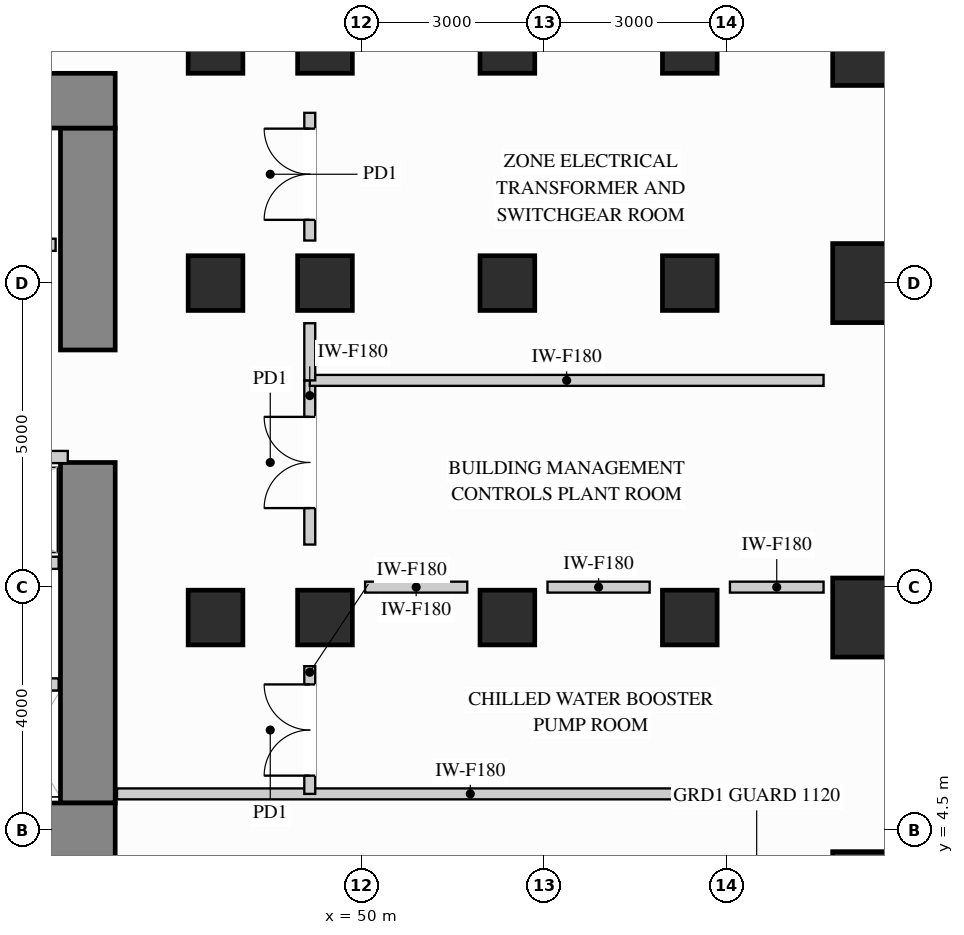
"""IFC4 building model, lengths in metres.
Left out: names, types, materials, properties, quantities, classifications, styles, units other than length and angle.
Written with IfcOpenShell. Run it as: python <this file> out.ifc"""

import sys

from ifc_helpers import new_model, si_unit, direction, frame, frame_2d, origin, origin_2d, place, context, subcontext, project, spatial, rectangle, extrude, source, transform, mapped, element, fill, save


model = new_model("IFC4")
c1 = context("Model", 3, precision=1e-05, world=origin(), true_north=direction((0.0, 1.0)))
c2 = subcontext(c1, "Body", "Model", "MODEL_VIEW")
j1 = project(units=[si_unit("LENGTHUNIT", "METRE"), si_unit("PLANEANGLEUNIT", "RADIAN")], contexts=[c1])
p1 = place(None, origin())
s1 = spatial("IfcSite", under=j1, at=p1, CompositionType="ELEMENT")
p2 = place(p1, origin())
s2 = spatial("IfcBuilding", under=s1, at=p2, CompositionType="ELEMENT")
p3 = place(p2, frame((0.0, 0.0, 72.9)))
s3 = spatial("IfcBuildingStorey", under=s2, at=p3, CompositionType="ELEMENT", Elevation=72.9)
m1 = source(origin(), c2, "Body", "SweptSolid", [
    extrude(rectangle(XDim=0.9, YDim=0.9, at=origin_2d()), origin(), (0.0, 0.0, 1.0), 4.26),
])
for number, where, z_axis, x_axis in (
    (1, (47.6, 13.5, 0.0), (0.0, 0.0, 1.0), (1.0, 0.0, 0.0)),
    (2, (47.6, 8.0, 0.0), (0.0, 0.0, 1.0), (1.0, 0.0, 0.0)),
    (3, (47.6, 17.4, 0.0), (0.0, 0.0, 1.0), (1.0, 0.0, 0.0)),
    (4, (49.4, 13.5, 0.0), (0.0, 0.0, 1.0), (1.0, 0.0, 0.0)),
    (5, (49.4, 17.4, 0.0), (0.0, 0.0, 1.0), (1.0, 0.0, 0.0)),
    (6, (49.4, 8.0, 0.0), (0.0, 0.0, 1.0), (1.0, 0.0, 0.0)),
    (7, (52.4, 13.5, 0.0), (0.0, 0.0, 1.0), (1.0, 0.0, 0.0)),
    (8, (52.4, 17.4, 0.0), (0.0, 0.0, 1.0), (1.0, 0.0, 0.0)),
    (9, (52.4, 8.0, 0.0), (0.0, 0.0, 1.0), (1.0, 0.0, 0.0)),
    (10, (55.4, 13.5, 0.0), (0.0, 0.0, 1.0), (1.0, 0.0, 0.0)),
    (11, (55.4, 17.4, 0.0), (0.0, 0.0, 1.0), (1.0, 0.0, 0.0)),
    (12, (55.4, 8.0, 0.0), (0.0, 0.0, 1.0), (1.0, 0.0, 0.0)),
):
    element("IfcColumn", number, at=place(p3, frame(where, z_axis=z_axis, x_axis=x_axis)), inside=s3, PredefinedType="COLUMN", context=c2, shape_type="MappedRepresentation", body=[
        mapped(m1, transform((0.0, 0.0, 0.0), x_axis=(1.0, 0.0, 0.0), y_axis=(0.0, 1.0, 0.0), z_axis=(0.0, 0.0, 1.0))),
    ])
m2 = source(origin(), c2, "Body", "SweptSolid", [
    extrude(rectangle(XDim=1.3, YDim=1.3, at=origin_2d()), origin(), (0.0, 0.0, 1.0), 4.26),
])
for number, where, z_axis, x_axis in (
    (13, (58.4, 13.5, 0.0), (0.0, 0.0, 1.0), (1.0, 0.0, 0.0)),
    (14, (58.4, 17.4, 0.0), (0.0, 0.0, 1.0), (1.0, 0.0, 0.0)),
    (15, (58.4, 3.5, 0.0), (0.0, 0.0, 1.0), (1.0, 0.0, 0.0)),
    (16, (58.4, 8.0, 0.0), (0.0, 0.0, 1.0), (1.0, 0.0, 0.0)),
):
    element("IfcColumn", number, at=place(p3, frame(where, z_axis=z_axis, x_axis=x_axis)), inside=s3, PredefinedType="COLUMN", context=c2, shape_type="MappedRepresentation", body=[
        mapped(m2, transform((0.0, 0.0, 0.0), x_axis=(1.0, 0.0, 0.0), y_axis=(0.0, 1.0, 0.0), z_axis=(0.0, 0.0, 1.0))),
    ])
m3 = source(origin(), c2, "Body", "SweptSolid", [
    extrude(rectangle(XDim=5.6, YDim=0.9, at=frame_2d((2.8, 0.0))), origin(), (0.0, 0.0, 1.0), 4.26),
])
p4 = place(p3, frame((45.5, 4.95, 0.0), z_axis=(0.0, 0.0, 1.0), x_axis=(0.0, 1.0, 0.0)))
e17 = element("IfcWall", 17, at=p4, inside=s3, PredefinedType="SHEAR", context=c2, shape_type="MappedRepresentation", body=[
    mapped(m3, transform((0.0, 0.0, 0.0), x_axis=(1.0, 0.0, 0.0), y_axis=(0.0, 1.0, 0.0), z_axis=(0.0, 0.0, 1.0))),
])
m4 = source(origin(), c2, "Body", "SweptSolid", [
    extrude(rectangle(XDim=3.65, YDim=0.9, at=frame_2d((1.825, 0.0))), origin(), (0.0, 0.0, 1.0), 4.26),
])
p5 = place(p3, frame((45.5, 12.4, 0.0), z_axis=(0.0, 0.0, 1.0), x_axis=(0.0, 1.0, 0.0)))
e18 = element("IfcWall", 18, at=p5, inside=s3, PredefinedType="SHEAR", context=c2, shape_type="MappedRepresentation", body=[
    mapped(m4, transform((0.0, 0.0, 0.0), x_axis=(1.0, 0.0, 0.0), y_axis=(0.0, 1.0, 0.0), z_axis=(0.0, 0.0, 1.0))),
])
m5 = source(origin(), c2, "Body", "SweptSolid", [
    extrude(rectangle(XDim=10.4, YDim=0.9, at=frame_2d((5.2, 0.0))), origin(), (0.0, 0.0, 1.0), 4.26),
])
for number, where, z_axis, x_axis in (
    (19, (35.55, 16.5, 0.0), (0.0, 0.0, 1.0), (1.0, 0.0, 0.0)),
    (20, (35.55, 4.5, 0.0), (0.0, 0.0, 1.0), (1.0, 0.0, 0.0)),
):
    element("IfcWall", number, at=place(p3, frame(where, z_axis=z_axis, x_axis=x_axis)), inside=s3, PredefinedType="SHEAR", context=c2, shape_type="MappedRepresentation", body=[
        mapped(m5, transform((0.0, 0.0, 0.0), x_axis=(1.0, 0.0, 0.0), y_axis=(0.0, 1.0, 0.0), z_axis=(0.0, 0.0, 1.0))),
    ])
p6 = place(p3, frame((49.15, 9.2, 0.0), z_axis=(0.0, 0.0, 1.0), x_axis=(0.0, 1.0, 0.0)))
e21 = element("IfcWall", 21, at=p6, inside=s3, PredefinedType="PARTITIONING", context=c2, shape_type="SweptSolid", body=[
    extrude(rectangle(XDim=2.7, YDim=0.18, at=frame_2d((1.35, 0.0))), origin(), (0.0, 0.0, 1.0), 3.245),
])
p7 = place(p6, frame((0.6, 0.0, 0.0)))
e22 = element("IfcOpeningElement", 22, at=p7, cuts=e21, PredefinedType="OPENING", context=c2, shape_type="SweptSolid", body=[
    extrude(rectangle(XDim=1.5, YDim=2.2, at=frame_2d((0.75, 1.1))), frame((0.0, 0.1, 0.0), z_axis=(0.0, -1.0, 0.0), x_axis=(1.0, 0.0, 0.0)), (0.0, 0.0, 1.0), 0.2),
])
m6 = source(origin(), c2, "Body", "SweptSolid", [
    extrude(rectangle(XDim=8.45, YDim=0.18, at=frame_2d((4.225, 0.0))), origin(), (0.0, 0.0, 1.0), 3.776),
])
p8 = place(p3, frame((49.15, 11.9, 0.0), z_axis=(0.0, 0.0, 1.0), x_axis=(1.0, 0.0, 0.0)))
e23 = element("IfcWall", 23, at=p8, inside=s3, PredefinedType="PARTITIONING", context=c2, shape_type="MappedRepresentation", body=[
    mapped(m6, transform((0.0, 0.0, 0.0), x_axis=(1.0, 0.0, 0.0), y_axis=(0.0, 1.0, 0.0), z_axis=(0.0, 0.0, 1.0))),
])
m7 = source(origin(), c2, "Body", "SweptSolid", [
    extrude(rectangle(XDim=11.62, YDim=0.18, at=frame_2d((5.81, 0.0))), origin(), (0.0, 0.0, 1.0), 4.245),
])
p9 = place(p3, frame((45.98, 5.1, 0.0), z_axis=(0.0, 0.0, 1.0), x_axis=(1.0, 0.0, 0.0)))
e24 = element("IfcWall", 24, at=p9, inside=s3, PredefinedType="PARTITIONING", context=c2, shape_type="MappedRepresentation", body=[
    mapped(m7, transform((0.0, 0.0, 0.0), x_axis=(1.0, 0.0, 0.0), y_axis=(0.0, 1.0, 0.0), z_axis=(0.0, 0.0, 1.0))),
])
p10 = place(p3, frame((49.15, 5.1, 0.0), z_axis=(0.0, 0.0, 1.0), x_axis=(0.0, 1.0, 0.0)))
e25 = element("IfcWall", 25, at=p10, inside=s3, PredefinedType="PARTITIONING", context=c2, shape_type="SweptSolid", body=[
    extrude(rectangle(XDim=2.1, YDim=0.18, at=frame_2d((1.05, 0.0))), origin(), (0.0, 0.0, 1.0), 3.245),
])
p11 = place(p10, frame((0.3, 0.0, 0.0)))
e26 = element("IfcOpeningElement", 26, at=p11, cuts=e25, PredefinedType="OPENING", context=c2, shape_type="SweptSolid", body=[
    extrude(rectangle(XDim=1.5, YDim=2.2, at=frame_2d((0.75, 1.1))), frame((0.0, 0.1, 0.0), z_axis=(0.0, -1.0, 0.0), x_axis=(1.0, 0.0, 0.0)), (0.0, 0.0, 1.0), 0.2),
])
m8 = source(origin(), c2, "Body", "SweptSolid", [
    extrude(rectangle(XDim=1.68, YDim=0.18, at=frame_2d((0.84, 0.0))), origin(), (0.0, 0.0, 1.0), 4.245),
])
for number, where, z_axis, x_axis in (
    (27, (50.06, 8.5, 0.0), (0.0, 0.0, 1.0), (1.0, 0.0, 0.0)),
    (28, (53.06, 8.5, 0.0), (0.0, 0.0, 1.0), (1.0, 0.0, 0.0)),
):
    element("IfcWall", number, at=place(p3, frame(where, z_axis=z_axis, x_axis=x_axis)), inside=s3, PredefinedType="PARTITIONING", context=c2, shape_type="MappedRepresentation", body=[
        mapped(m8, transform((0.0, 0.0, 0.0), x_axis=(1.0, 0.0, 0.0), y_axis=(0.0, 1.0, 0.0), z_axis=(0.0, 0.0, 1.0))),
    ])
m9 = source(origin(), c2, "Body", "SweptSolid", [
    extrude(rectangle(XDim=1.54, YDim=0.18, at=frame_2d((0.77, 0.0))), origin(), (0.0, 0.0, 1.0), 4.245),
])
p12 = place(p3, frame((56.06, 8.5, 0.0), z_axis=(0.0, 0.0, 1.0), x_axis=(1.0, 0.0, 0.0)))
e29 = element("IfcWall", 29, at=p12, inside=s3, PredefinedType="PARTITIONING", context=c2, shape_type="MappedRepresentation", body=[
    mapped(m9, transform((0.0, 0.0, 0.0), x_axis=(1.0, 0.0, 0.0), y_axis=(0.0, 1.0, 0.0), z_axis=(0.0, 0.0, 1.0))),
])
p13 = place(p3, frame((49.15, 14.2, 0.0), z_axis=(0.0, 0.0, 1.0), x_axis=(0.0, 1.0, 0.0)))
e30 = element("IfcWall", 30, at=p13, inside=s3, PredefinedType="PARTITIONING", context=c2, shape_type="SweptSolid", body=[
    extrude(rectangle(XDim=2.1, YDim=0.18, at=frame_2d((1.05, 0.0))), origin(), (0.0, 0.0, 1.0), 3.245),
])
p14 = place(p13, frame((0.34, 0.0, 0.0)))
e31 = element("IfcOpeningElement", 31, at=p14, cuts=e30, PredefinedType="OPENING", context=c2, shape_type="SweptSolid", body=[
    extrude(rectangle(XDim=1.5, YDim=2.2, at=frame_2d((0.75, 1.1))), frame((0.0, 0.1, 0.0), z_axis=(0.0, -1.0, 0.0), x_axis=(1.0, 0.0, 0.0)), (0.0, 0.0, 1.0), 0.2),
])
m10 = source(origin(), c2, "Body", "SweptSolid", [
    extrude(rectangle(XDim=0.94, YDim=0.18, at=frame_2d((0.47, 0.0))), origin(), (0.0, 0.0, 1.0), 3.245),
])
p15 = place(p3, frame((49.15, 11.9, 0.0), z_axis=(0.0, 0.0, 1.0), x_axis=(0.0, 1.0, 0.0)))
e32 = element("IfcWall", 32, at=p15, inside=s3, PredefinedType="PARTITIONING", context=c2, shape_type="MappedRepresentation", body=[
    mapped(m10, transform((0.0, 0.0, 0.0), x_axis=(1.0, 0.0, 0.0), y_axis=(0.0, 1.0, 0.0), z_axis=(0.0, 0.0, 1.0))),
])
m11 = source(origin(), c2, "Body", "SweptSolid", [
    extrude(rectangle(XDim=1.17, YDim=0.2, at=frame_2d((0.585, 0.0))), origin(), (0.0, 0.0, 1.0), 4.245),
])
p16 = place(p3, frame((43.85, 6.9, 0.0), z_axis=(0.0, 0.0, 1.0), x_axis=(1.0, 0.0, 0.0)))
e33 = element("IfcWall", 33, at=p16, inside=s3, PredefinedType="PARTITIONING", context=c2, shape_type="MappedRepresentation", body=[
    mapped(m11, transform((0.0, 0.0, 0.0), x_axis=(1.0, 0.0, 0.0), y_axis=(0.0, 1.0, 0.0), z_axis=(0.0, 0.0, 1.0))),
])
p17 = place(p3, frame((42.23, 14.13, 0.0), z_axis=(0.0, 0.0, 1.0), x_axis=(1.0, 0.0, 0.0)))
e34 = element("IfcWall", 34, at=p17, inside=s3, PredefinedType="PARTITIONING", context=c2, shape_type="SweptSolid", body=[
    extrude(rectangle(XDim=2.74, YDim=0.2, at=frame_2d((1.37, 0.0))), origin(), (0.0, 0.0, 1.0), 4.245),
])
p18 = place(p17, frame((0.82, 0.0, 0.0)))
e35 = element("IfcOpeningElement", 35, at=p18, cuts=e34, PredefinedType="OPENING", context=c2, shape_type="SweptSolid", body=[
    extrude(rectangle(XDim=1.1, YDim=2.2, at=frame_2d((0.55, 1.1))), frame((0.0, 0.11, 0.0), z_axis=(0.0, -1.0, 0.0), x_axis=(1.0, 0.0, 0.0)), (0.0, 0.0, 1.0), 0.22),
])
m12 = source(origin(), c2, "Body", "SweptSolid", [
    extrude(rectangle(XDim=3.49, YDim=0.2, at=frame_2d((1.745, 0.0))), origin(), (0.0, 0.0, 1.0), 4.245),
])
p19 = place(p3, frame((41.68, 10.64, 0.0), z_axis=(0.0, 0.0, 1.0), x_axis=(1.0, 0.0, 0.0)))
e36 = element("IfcWall", 36, at=p19, inside=s3, PredefinedType="PARTITIONING", context=c2, shape_type="MappedRepresentation", body=[
    mapped(m12, transform((0.0, 0.0, 0.0), x_axis=(1.0, 0.0, 0.0), y_axis=(0.0, 1.0, 0.0), z_axis=(0.0, 0.0, 1.0))),
])
m13 = source(origin(), c2, "Body", "SweptSolid", [
    extrude(rectangle(XDim=3.34, YDim=0.2, at=frame_2d((1.67, 0.0))), origin(), (0.0, 0.0, 1.0), 4.245),
])
p20 = place(p3, frame((41.68, 8.9, 0.0), z_axis=(0.0, 0.0, 1.0), x_axis=(1.0, 0.0, 0.0)))
e37 = element("IfcWall", 37, at=p20, inside=s3, PredefinedType="PARTITIONING", context=c2, shape_type="MappedRepresentation", body=[
    mapped(m13, transform((0.0, 0.0, 0.0), x_axis=(1.0, 0.0, 0.0), y_axis=(0.0, 1.0, 0.0), z_axis=(0.0, 0.0, 1.0))),
])
m14 = source(origin(), c2, "Body", "SweptSolid", [
    extrude(rectangle(XDim=1.5, YDim=2.2, at=frame_2d((0.75, 1.1))), frame((0.0, 0.025, 0.0), z_axis=(0.0, -1.0, 0.0), x_axis=(1.0, 0.0, 0.0)), (0.0, 0.0, 1.0), 0.05),
])
p21 = place(p7, origin())
e38 = element("IfcDoor", 38, at=p21, inside=s3, OperationType="DOUBLE_DOOR_SINGLE_SWING", PredefinedType="DOOR", context=c2, shape_type="MappedRepresentation", body=[
    mapped(m14, transform((0.0, 0.0, 0.0), x_axis=(1.0, 0.0, 0.0), y_axis=(0.0, 1.0, 0.0), z_axis=(0.0, 0.0, 1.0))),
])
fill(e22, e38)
p22 = place(p11, origin())
e39 = element("IfcDoor", 39, at=p22, inside=s3, OperationType="DOUBLE_DOOR_SINGLE_SWING", PredefinedType="DOOR", context=c2, shape_type="MappedRepresentation", body=[
    mapped(m14, transform((0.0, 0.0, 0.0), x_axis=(1.0, 0.0, 0.0), y_axis=(0.0, 1.0, 0.0), z_axis=(0.0, 0.0, 1.0))),
])
fill(e26, e39)
p23 = place(p14, origin())
e40 = element("IfcDoor", 40, at=p23, inside=s3, OperationType="DOUBLE_DOOR_SINGLE_SWING", PredefinedType="DOOR", context=c2, shape_type="MappedRepresentation", body=[
    mapped(m14, transform((0.0, 0.0, 0.0), x_axis=(1.0, 0.0, 0.0), y_axis=(0.0, 1.0, 0.0), z_axis=(0.0, 0.0, 1.0))),
])
fill(e31, e40)
save(model, sys.argv[1])
